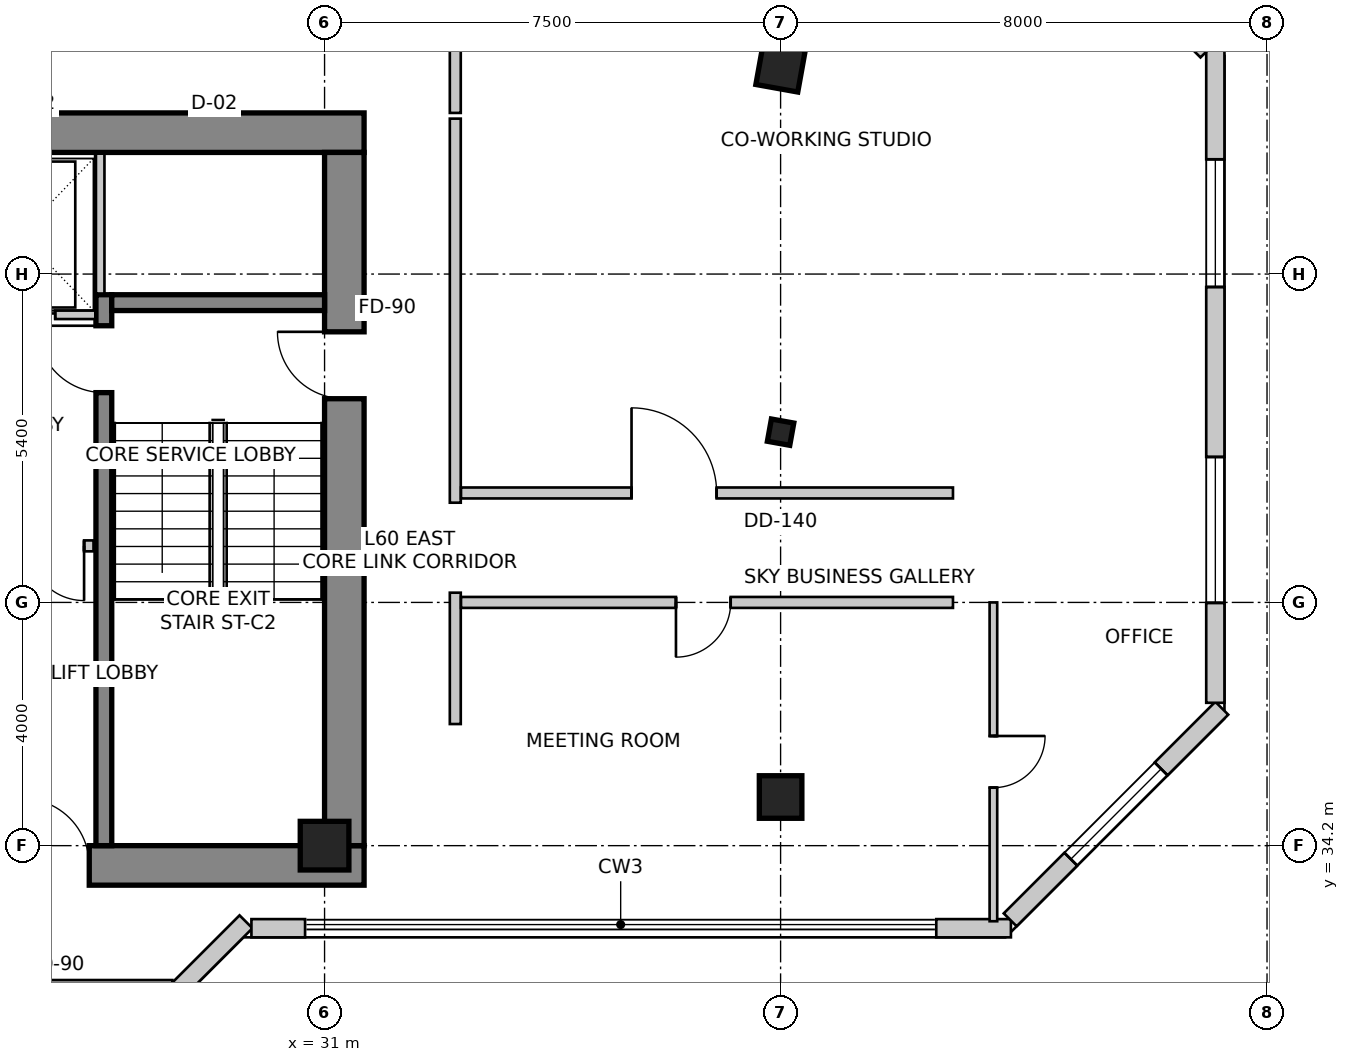
"""IFC4 building model, lengths in metres.
Left out: names, types, materials, properties, quantities, classifications, styles, units other than length and angle.
Written with IfcOpenShell. Run it as: python <this file> out.ifc"""

import sys

from ifc_helpers import new_model, si_unit, direction, frame, frame_2d, origin, origin_2d, place, context, subcontext, project, spatial, rectangle, i_section, extrude, source, transform, mapped, element, fill, save


model = new_model("IFC4")
c1 = context("Model", 3, precision=1e-05, world=origin(), true_north=direction((0.0, 1.0)))
c2 = subcontext(c1, "Body", "Model", "MODEL_VIEW")
j1 = project(units=[si_unit("LENGTHUNIT", "METRE"), si_unit("PLANEANGLEUNIT", "RADIAN")], contexts=[c1])
p1 = place(None, origin())
s1 = spatial("IfcSite", under=j1, at=p1, CompositionType="ELEMENT")
p2 = place(p1, origin())
s2 = spatial("IfcBuilding", under=s1, at=p2, CompositionType="ELEMENT")
p3 = place(p2, frame((0.0, 0.0, 235.9)))
s3 = spatial("IfcBuildingStorey", under=s2, at=p3, CompositionType="ELEMENT", Elevation=235.9)
p4 = place(p3, frame((15.95, 45.925, 0.0), z_axis=(0.0, 0.0, 1.0), x_axis=(1.0, 0.0, 0.0)))
e1 = element("IfcWall", 1, at=p4, inside=s3, PredefinedType="SHEAR", context=c2, shape_type="SweptSolid", body=[
    extrude(rectangle(XDim=15.7, YDim=0.65, at=frame_2d((7.85, 0.0))), origin(), (0.0, 0.0, 1.0), 3.5),
])
p5 = place(p3, frame((15.95, 33.875, 0.0), z_axis=(0.0, 0.0, 1.0), x_axis=(1.0, 0.0, 0.0)))
e2 = element("IfcWall", 2, at=p5, inside=s3, PredefinedType="SHEAR", context=c2, shape_type="SweptSolid", body=[
    extrude(rectangle(XDim=15.7, YDim=0.65, at=frame_2d((7.85, 0.0))), origin(), (0.0, 0.0, 1.0), 3.5),
])
m1 = source(origin(), c2, "Body", "SweptSolid", [
    extrude(rectangle(XDim=1.1, YDim=2.15, at=frame_2d((0.55, 1.075))), frame((0.0, 0.335, 0.0), z_axis=(0.0, -1.0, 0.0), x_axis=(1.0, 0.0, 0.0)), (0.0, 0.0, 1.0), 0.67),
])
p6 = place(p5, frame((10.08, 0.0, 0.0)))
e3 = element("IfcOpeningElement", 3, at=p6, cuts=e2, PredefinedType="OPENING", context=c2, shape_type="MappedRepresentation", body=[
    mapped(m1, transform((0.0, 0.0, 0.0), scale=1.0)),
])
p7 = place(p3, frame((31.325, 34.2, 0.0), z_axis=(0.0, 0.0, 1.0), x_axis=(0.0, 1.0, 0.0)))
e4 = element("IfcWall", 4, at=p7, inside=s3, PredefinedType="SHEAR", context=c2, shape_type="SweptSolid", body=[
    extrude(rectangle(XDim=11.4, YDim=0.65, at=frame_2d((5.7, 0.0))), origin(), (0.0, 0.0, 1.0), 3.5),
])
p8 = place(p7, frame((7.35, 0.0, 0.0)))
e5 = element("IfcOpeningElement", 5, at=p8, cuts=e4, PredefinedType="OPENING", context=c2, shape_type="MappedRepresentation", body=[
    mapped(m1, transform((0.0, 0.0, 0.0), scale=1.0)),
])
p9 = place(p3, frame((27.37, 34.2, 0.0), z_axis=(0.0, 0.0, 1.0), x_axis=(0.0, 1.0, 0.0)))
e6 = element("IfcWall", 6, at=p9, inside=s3, PredefinedType="SHEAR", context=c2, shape_type="SweptSolid", body=[
    extrude(rectangle(XDim=9.06, YDim=0.26, at=frame_2d((4.53, 0.0))), origin(), (0.0, 0.0, 1.0), 3.5),
])
m2 = source(origin(), c2, "Body", "SweptSolid", [
    extrude(rectangle(XDim=1.1, YDim=2.15, at=frame_2d((0.55, 1.075))), frame((0.0, 0.14, 0.0), z_axis=(0.0, -1.0, 0.0), x_axis=(1.0, 0.0, 0.0)), (0.0, 0.0, 1.0), 0.28),
])
p10 = place(p9, frame((7.45, 0.0, 0.0)))
e7 = element("IfcOpeningElement", 7, at=p10, cuts=e6, PredefinedType="OPENING", context=c2, shape_type="MappedRepresentation", body=[
    mapped(m2, transform((0.0, 0.0, 0.0), scale=1.0)),
])
p11 = place(p3, frame((27.5, 43.13, 0.0), z_axis=(0.0, 0.0, 1.0), x_axis=(1.0, 0.0, 0.0)))
e8 = element("IfcWall", 8, at=p11, inside=s3, PredefinedType="SHEAR", context=c2, shape_type="SweptSolid", body=[
    extrude(rectangle(XDim=3.5, YDim=0.26, at=frame_2d((1.75, 0.0))), origin(), (0.0, 0.0, 1.0), 3.5),
])
m3 = source(origin(), c2, "Body", "SweptSolid", [
    extrude(rectangle(XDim=0.7, YDim=0.7, at=origin_2d()), origin(), (0.0, 0.0, 1.0), 3.5),
])
p12 = place(p3, frame((38.5, 47.0, 0.0), z_axis=(0.0, 0.0, 1.0), x_axis=(0.984195607969, -0.17708474032, 0.0)))
e9 = element("IfcColumn", 9, at=p12, inside=s3, PredefinedType="COLUMN", context=c2, shape_type="MappedRepresentation", body=[
    mapped(m3, transform((0.0, 0.0, 0.0), scale=1.0)),
])
m4 = source(origin(), c2, "Body", "SweptSolid", [
    extrude(rectangle(XDim=0.8, YDim=0.8, at=origin_2d()), origin(), (0.0, 0.0, 1.0), 3.5),
])
p13 = place(p3, frame((31.0, 34.2, 0.0), z_axis=(0.0, 0.0, 1.0), x_axis=(1.0, 0.0, 0.0)))
e10 = element("IfcColumn", 10, at=p13, inside=s3, PredefinedType="COLUMN", context=c2, shape_type="MappedRepresentation", body=[
    mapped(m4, transform((0.0, 0.0, 0.0), scale=1.0)),
])
p14 = place(p3, frame((38.5, 35.0, 0.0), z_axis=(0.0, 0.0, 1.0), x_axis=(1.0, 0.0, 0.0)))
e11 = element("IfcColumn", 11, at=p14, inside=s3, PredefinedType="COLUMN", context=c2, shape_type="MappedRepresentation", body=[
    mapped(m3, transform((0.0, 0.0, 0.0), scale=1.0)),
])
m5 = source(origin(), c2, "Body", "SweptSolid", [
    extrude(i_section(OverallWidth=0.374, OverallDepth=0.372, WebThickness=0.016, FlangeThickness=0.026, FilletRadius=0.015, at=origin_2d()), origin(), (0.0, 0.0, 1.0), 3.5),
])
p15 = place(p3, frame((38.5, 41.0, 0.0), z_axis=(0.0, 0.0, 1.0), x_axis=(0.984195607969, -0.17708474032, 0.0)))
e12 = element("IfcColumn", 12, at=p15, inside=s3, PredefinedType="COLUMN", context=c2, shape_type="MappedRepresentation", body=[
    mapped(m5, transform((0.0, 0.0, 0.0), scale=1.0)),
])
p16 = place(p3, frame((27.652, 30.892, 0.0), z_axis=(0.0, 0.0, 1.0), x_axis=(0.707106781187, 0.707106781187, 0.0)))
e13 = element("IfcWall", 13, at=p16, inside=s3, PredefinedType="SOLIDWALL", context=c2, shape_type="SweptSolid", body=[
    extrude(rectangle(XDim=2.907, YDim=0.3, at=frame_2d((1.454, 0.0))), origin(), (0.0, 0.0, 1.0), 3.25),
])
p17 = place(p3, frame((29.797, 32.842, 0.0), z_axis=(0.0, 0.0, 1.0), x_axis=(1.0, 0.0, 0.0)))
e14 = element("IfcWall", 14, at=p17, inside=s3, PredefinedType="SOLIDWALL", context=c2, shape_type="SweptSolid", body=[
    extrude(rectangle(XDim=0.882, YDim=0.3, at=frame_2d((0.441, 0.0))), origin(), (0.0, 0.0, 1.0), 3.25),
])
p18 = place(p3, frame((41.06, 32.842, 0.0), z_axis=(0.0, 0.0, 1.0), x_axis=(1.0, 0.0, 0.0)))
e15 = element("IfcWall", 15, at=p18, inside=s3, PredefinedType="SOLIDWALL", context=c2, shape_type="SweptSolid", body=[
    extrude(rectangle(XDim=1.228, YDim=0.3, at=frame_2d((0.614, 0.0))), origin(), (0.0, 0.0, 1.0), 3.25),
])
p19 = place(p3, frame((42.276, 32.98, 0.0), z_axis=(0.0, 0.0, 1.0), x_axis=(0.707106781187, 0.707106781187, 0.0)))
e16 = element("IfcWall", 16, at=p19, inside=s3, PredefinedType="SOLIDWALL", context=c2, shape_type="SweptSolid", body=[
    extrude(rectangle(XDim=4.922, YDim=0.3, at=frame_2d((2.461, 0.0))), origin(), (0.0, 0.0, 1.0), 3.25),
])
m6 = source(origin(), c2, "Body", "SweptSolid", [
    extrude(rectangle(XDim=2.1, YDim=2.0, at=frame_2d((1.05, 1.0))), frame((0.0, 0.16, 0.0), z_axis=(0.0, -1.0, 0.0), x_axis=(1.0, 0.0, 0.0)), (0.0, 0.0, 1.0), 0.32),
])
p20 = place(p19, frame((1.411, 0.0, 0.85)))
e17 = element("IfcOpeningElement", 17, at=p20, cuts=e16, PredefinedType="OPENING", context=c2, shape_type="MappedRepresentation", body=[
    mapped(m6, transform((0.0, 0.0, 0.0), scale=1.0)),
])
p21 = place(p3, frame((45.65, 36.549, 0.0), z_axis=(0.0, 0.0, 1.0), x_axis=(0.0, 1.0, 0.0)))
e18 = element("IfcWall", 18, at=p21, inside=s3, PredefinedType="SOLIDWALL", context=c2, shape_type="SweptSolid", body=[
    extrude(rectangle(XDim=10.73, YDim=0.3, at=frame_2d((5.365, 0.0))), origin(), (0.0, 0.0, 1.0), 3.25),
])
m7 = source(origin(), c2, "Body", "SweptSolid", [
    extrude(rectangle(XDim=2.4, YDim=2.2, at=frame_2d((1.2, 1.1))), frame((0.0, 0.16, 0.0), z_axis=(0.0, -1.0, 0.0), x_axis=(1.0, 0.0, 0.0)), (0.0, 0.0, 1.0), 0.32),
])
p22 = place(p21, frame((1.643, 0.0, 0.85)))
e19 = element("IfcOpeningElement", 19, at=p22, cuts=e18, PredefinedType="OPENING", context=c2, shape_type="MappedRepresentation", body=[
    mapped(m7, transform((0.0, 0.0, 0.0), scale=1.0)),
])
p23 = place(p21, frame((6.838, 0.0, 0.85)))
e20 = element("IfcOpeningElement", 20, at=p23, cuts=e18, PredefinedType="OPENING", context=c2, shape_type="MappedRepresentation", body=[
    mapped(m6, transform((0.0, 0.0, 0.0), scale=1.0)),
])
p24 = place(p3, frame((45.512, 47.268, 0.0), z_axis=(0.0, 0.0, 1.0), x_axis=(-0.707106781187, 0.707106781187, 0.0)))
e21 = element("IfcWall", 21, at=p24, inside=s3, PredefinedType="SOLIDWALL", context=c2, shape_type="SweptSolid", body=[
    extrude(rectangle(XDim=2.674, YDim=0.3, at=frame_2d((1.337, 0.0))), origin(), (0.0, 0.0, 1.0), 3.25),
])
m8 = source(origin(), c2, "Body", "SweptSolid", [
    extrude(rectangle(XDim=1.5, YDim=1.8, at=frame_2d((0.75, 0.9))), frame((0.0, 0.16, 0.0), z_axis=(0.0, -1.0, 0.0), x_axis=(1.0, 0.0, 0.0)), (0.0, 0.0, 1.0), 0.32),
])
p25 = place(p24, frame((0.587, 0.0, 0.85)))
e22 = element("IfcOpeningElement", 22, at=p25, cuts=e21, PredefinedType="OPENING", context=c2, shape_type="MappedRepresentation", body=[
    mapped(m8, transform((0.0, 0.0, 0.0), scale=1.0)),
])
p26 = place(p3, frame((20.37, 42.93, 0.0), z_axis=(0.0, 0.0, 1.0), x_axis=(1.0, 0.0, 0.0)))
e23 = element("IfcWall", 23, at=p26, inside=s3, PredefinedType="SOLIDWALL", context=c2, shape_type="SweptSolid", body=[
    extrude(rectangle(XDim=6.86, YDim=0.14, at=frame_2d((3.43, 0.0))), origin(), (0.0, 0.0, 1.0), 3.25),
])
m9 = source(origin(), c2, "Body", "SweptSolid", [
    extrude(rectangle(XDim=1.1, YDim=2.15, at=frame_2d((0.55, 1.075))), frame((0.0, 0.08, 0.0), z_axis=(0.0, -1.0, 0.0), x_axis=(1.0, 0.0, 0.0)), (0.0, 0.0, 1.0), 0.16),
])
p27 = place(p26, frame((0.5, 0.0, 0.0)))
e24 = element("IfcOpeningElement", 24, at=p27, cuts=e23, PredefinedType="OPENING", context=c2, shape_type="MappedRepresentation", body=[
    mapped(m9, transform((0.0, 0.0, 0.0), scale=1.0)),
])
p28 = place(p26, frame((2.7, 0.0, 0.0)))
e25 = element("IfcOpeningElement", 25, at=p28, cuts=e23, PredefinedType="OPENING", context=c2, shape_type="MappedRepresentation", body=[
    mapped(m9, transform((0.0, 0.0, 0.0), scale=1.0)),
])
p29 = place(p26, frame((5.1, 0.0, 0.0)))
e26 = element("IfcOpeningElement", 26, at=p29, cuts=e23, PredefinedType="OPENING", context=c2, shape_type="MappedRepresentation", body=[
    mapped(m9, transform((0.0, 0.0, 0.0), scale=1.0)),
])
p30 = place(p3, frame((27.31, 43.28, 0.0), z_axis=(0.0, 0.0, 1.0), x_axis=(0.0, 1.0, 0.0)))
e27 = element("IfcWall", 27, at=p30, inside=s3, PredefinedType="SOLIDWALL", context=c2, shape_type="SweptSolid", body=[
    extrude(rectangle(XDim=2.3, YDim=0.14, at=frame_2d((1.15, 0.0))), origin(), (0.0, 0.0, 1.0), 3.25),
])
p31 = place(p3, frame((27.2, 39.13, 0.0), z_axis=(0.0, 0.0, 1.0), x_axis=(-1.0, 0.0, 0.0)))
e28 = element("IfcWall", 28, at=p31, inside=s3, PredefinedType="PARTITIONING", context=c2, shape_type="SweptSolid", body=[
    extrude(rectangle(XDim=1.21, YDim=0.18, at=frame_2d((0.605, 0.0))), origin(), (0.0, 0.0, 1.0), 3.25),
])
m10 = source(origin(), c2, "Body", "SweptSolid", [
    extrude(rectangle(XDim=0.9, YDim=2.15, at=frame_2d((0.45, 1.075))), frame((0.0, 0.1, 0.0), z_axis=(0.0, -1.0, 0.0), x_axis=(1.0, 0.0, 0.0)), (0.0, 0.0, 1.0), 0.2),
])
p32 = place(p31, frame((0.155, 0.0, 0.0)))
e29 = element("IfcOpeningElement", 29, at=p32, cuts=e28, PredefinedType="OPENING", context=c2, shape_type="MappedRepresentation", body=[
    mapped(m10, transform((0.0, 0.0, 0.0), scale=1.0)),
])
p33 = place(p3, frame((28.497, 31.9, 0.0), z_axis=(0.0, 0.0, 1.0), x_axis=(-1.0, 0.0, 0.0)))
e30 = element("IfcWall", 30, at=p33, inside=s3, PredefinedType="PARTITIONING", context=c2, shape_type="SweptSolid", body=[
    extrude(rectangle(XDim=9.057, YDim=0.18, at=frame_2d((4.529, 0.0))), origin(), (0.0, 0.0, 1.0), 2.835),
])
p34 = place(p3, frame((33.15, 47.706, 0.0), z_axis=(0.0, 0.0, 1.0), x_axis=(0.0, -1.0, 0.0)))
e31 = element("IfcWall", 31, at=p34, inside=s3, PredefinedType="PARTITIONING", context=c2, shape_type="SweptSolid", body=[
    extrude(rectangle(XDim=1.456, YDim=0.18, at=frame_2d((0.728, 0.0))), origin(), (0.0, 0.0, 1.0), 2.835),
])
p35 = place(p3, frame((33.15, 46.156, 0.0), z_axis=(0.0, 0.0, 1.0), x_axis=(0.0, -1.0, 0.0)))
e32 = element("IfcWall", 32, at=p35, inside=s3, PredefinedType="PARTITIONING", context=c2, shape_type="SweptSolid", body=[
    extrude(rectangle(XDim=6.316, YDim=0.18, at=frame_2d((3.158, 0.0))), origin(), (0.0, 0.0, 1.0), 2.688),
])
p36 = place(p3, frame((33.15, 38.36, 0.0), z_axis=(0.0, 0.0, 1.0), x_axis=(0.0, -1.0, 0.0)))
e33 = element("IfcWall", 33, at=p36, inside=s3, PredefinedType="PARTITIONING", context=c2, shape_type="SweptSolid", body=[
    extrude(rectangle(XDim=2.16, YDim=0.18, at=frame_2d((1.08, 0.0))), origin(), (0.0, 0.0, 1.0), 3.25),
])
p37 = place(p3, frame((33.244, 40.0, 0.0), z_axis=(0.0, 0.0, 1.0), x_axis=(1.0, 0.0, 0.0)))
e34 = element("IfcWall", 34, at=p37, inside=s3, PredefinedType="PARTITIONING", context=c2, shape_type="SweptSolid", body=[
    extrude(rectangle(XDim=8.091, YDim=0.18, at=frame_2d((4.045, 0.0))), origin(), (0.0, 0.0, 1.0), 2.766),
])
m11 = source(origin(), c2, "Body", "SweptSolid", [
    extrude(rectangle(XDim=1.4, YDim=2.15, at=frame_2d((0.7, 1.075))), frame((0.0, 0.1, 0.0), z_axis=(0.0, -1.0, 0.0), x_axis=(1.0, 0.0, 0.0)), (0.0, 0.0, 1.0), 0.2),
])
p38 = place(p37, frame((2.804, 0.0, 0.0)))
e35 = element("IfcOpeningElement", 35, at=p38, cuts=e34, PredefinedType="OPENING", context=c2, shape_type="MappedRepresentation", body=[
    mapped(m11, transform((0.0, 0.0, 0.0), scale=1.0)),
])
p39 = place(p3, frame((41.335, 38.2, 0.0), z_axis=(0.0, 0.0, 1.0), x_axis=(-1.0, 0.0, 0.0)))
e36 = element("IfcWall", 36, at=p39, inside=s3, PredefinedType="PARTITIONING", context=c2, shape_type="SweptSolid", body=[
    extrude(rectangle(XDim=8.091, YDim=0.18, at=frame_2d((4.045, 0.0))), origin(), (0.0, 0.0, 1.0), 2.766),
])
p40 = place(p39, frame((3.656, 0.0, 0.0)))
e37 = element("IfcOpeningElement", 37, at=p40, cuts=e36, PredefinedType="OPENING", context=c2, shape_type="MappedRepresentation", body=[
    mapped(m10, transform((0.0, 0.0, 0.0), scale=1.0)),
])
p41 = place(p3, frame((42.0, 38.2, 0.0), z_axis=(0.0, 0.0, 1.0), x_axis=(0.0, -1.0, 0.0)))
e38 = element("IfcWall", 38, at=p41, inside=s3, PredefinedType="PARTITIONING", context=c2, shape_type="SweptSolid", body=[
    extrude(rectangle(XDim=5.243, YDim=0.125, at=frame_2d((2.622, 0.0))), origin(), (0.0, 0.0, 1.0), 3.25),
])
m12 = source(origin(), c2, "Body", "SweptSolid", [
    extrude(rectangle(XDim=0.85, YDim=2.15, at=frame_2d((0.425, 1.075))), frame((0.0, 0.073, 0.0), z_axis=(0.0, -1.0, 0.0), x_axis=(1.0, 0.0, 0.0)), (0.0, 0.0, 1.0), 0.145),
])
p42 = place(p41, frame((2.197, 0.0, 0.0)))
e39 = element("IfcOpeningElement", 39, at=p42, cuts=e38, PredefinedType="OPENING", context=c2, shape_type="MappedRepresentation", body=[
    mapped(m12, transform((0.0, 0.0, 0.0), scale=1.0)),
])
m13 = source(origin(), c2, "Body", "SweptSolid", [
    extrude(rectangle(XDim=2.1, YDim=2.0, at=frame_2d((1.05, 1.0))), frame((0.0, -0.015, 0.0), z_axis=(0.0, -1.0, 0.0), x_axis=(1.0, 0.0, 0.0)), (0.0, 0.0, 1.0), 0.06),
])
p43 = place(p20, origin())
e40 = element("IfcWindow", 40, at=p43, inside=s3, PartitioningType="SINGLE_PANEL", PredefinedType="WINDOW", context=c2, shape_type="MappedRepresentation", body=[
    mapped(m13, transform((0.0, 0.0, 0.0), scale=1.0)),
])
fill(e17, e40)
m14 = source(origin(), c2, "Body", "SweptSolid", [
    extrude(rectangle(XDim=2.4, YDim=2.2, at=frame_2d((1.2, 1.1))), frame((0.0, -0.015, 0.0), z_axis=(0.0, -1.0, 0.0), x_axis=(1.0, 0.0, 0.0)), (0.0, 0.0, 1.0), 0.06),
])
p44 = place(p22, origin())
e41 = element("IfcWindow", 41, at=p44, inside=s3, PartitioningType="SINGLE_PANEL", PredefinedType="WINDOW", context=c2, shape_type="MappedRepresentation", body=[
    mapped(m14, transform((0.0, 0.0, 0.0), scale=1.0)),
])
fill(e19, e41)
p45 = place(p23, origin())
e42 = element("IfcWindow", 42, at=p45, inside=s3, PartitioningType="SINGLE_PANEL", PredefinedType="WINDOW", context=c2, shape_type="MappedRepresentation", body=[
    mapped(m13, transform((0.0, 0.0, 0.0), scale=1.0)),
])
fill(e20, e42)
m15 = source(origin(), c2, "Body", "SweptSolid", [
    extrude(rectangle(XDim=1.1, YDim=2.15, at=frame_2d((0.55, 1.075))), frame((0.0, 0.025, 0.0), z_axis=(0.0, -1.0, 0.0), x_axis=(1.0, 0.0, 0.0)), (0.0, 0.0, 1.0), 0.05),
])
p46 = place(p29, origin())
e43 = element("IfcDoor", 43, at=p46, inside=s3, OperationType="SLIDING_TO_LEFT", PredefinedType="DOOR", context=c2, shape_type="MappedRepresentation", body=[
    mapped(m15, transform((0.0, 0.0, 0.0), scale=1.0)),
])
fill(e26, e43)
m16 = source(origin(), c2, "Body", "SweptSolid", [
    extrude(rectangle(XDim=1.1, YDim=2.15, at=frame_2d((0.55, 1.075))), frame((0.0, 0.025, 0.0), z_axis=(0.0, -1.0, 0.0), x_axis=(1.0, 0.0, 0.0)), (0.0, 0.0, 1.0), 0.05),
])
p47 = place(p10, origin())
e44 = element("IfcDoor", 44, at=p47, inside=s3, OperationType="SINGLE_SWING_RIGHT", PredefinedType="DOOR", context=c2, shape_type="MappedRepresentation", body=[
    mapped(m16, transform((0.0, 0.0, 0.0), scale=1.0)),
])
fill(e7, e44)
p48 = place(p8, origin())
e45 = element("IfcDoor", 45, at=p48, inside=s3, OperationType="SINGLE_SWING_RIGHT", PredefinedType="DOOR", context=c2, shape_type="MappedRepresentation", body=[
    mapped(m16, transform((0.0, 0.0, 0.0), scale=1.0)),
])
fill(e5, e45)
p49 = place(p6, origin())
e46 = element("IfcDoor", 46, at=p49, inside=s3, OperationType="SINGLE_SWING_LEFT", PredefinedType="DOOR", context=c2, shape_type="MappedRepresentation", body=[
    mapped(m16, transform((0.0, 0.0, 0.0), scale=1.0)),
])
fill(e3, e46)
m17 = source(origin(), c2, "Body", "SweptSolid", [
    extrude(rectangle(XDim=0.9, YDim=2.15, at=frame_2d((0.45, 1.075))), frame((0.0, 0.025, 0.0), z_axis=(0.0, -1.0, 0.0), x_axis=(1.0, 0.0, 0.0)), (0.0, 0.0, 1.0), 0.05),
])
p50 = place(p32, origin())
e47 = element("IfcDoor", 47, at=p50, inside=s3, OperationType="SINGLE_SWING_LEFT", PredefinedType="DOOR", context=c2, shape_type="MappedRepresentation", body=[
    mapped(m17, transform((0.0, 0.0, 0.0), scale=1.0)),
])
fill(e29, e47)
m18 = source(origin(), c2, "Body", "SweptSolid", [
    extrude(rectangle(XDim=1.4, YDim=2.15, at=frame_2d((0.7, 1.075))), frame((0.0, 0.025, 0.0), z_axis=(0.0, -1.0, 0.0), x_axis=(1.0, 0.0, 0.0)), (0.0, 0.0, 1.0), 0.05),
])
p51 = place(p38, origin())
e48 = element("IfcDoor", 48, at=p51, inside=s3, OperationType="SINGLE_SWING_LEFT", PredefinedType="DOOR", context=c2, shape_type="MappedRepresentation", body=[
    mapped(m18, transform((0.0, 0.0, 0.0), scale=1.0)),
])
fill(e35, e48)
m19 = source(origin(), c2, "Body", "SweptSolid", [
    extrude(rectangle(XDim=0.9, YDim=2.15, at=frame_2d((0.45, 1.075))), frame((0.0, 0.025, 0.0), z_axis=(0.0, -1.0, 0.0), x_axis=(1.0, 0.0, 0.0)), (0.0, 0.0, 1.0), 0.05),
])
p52 = place(p40, origin())
e49 = element("IfcDoor", 49, at=p52, inside=s3, OperationType="SINGLE_SWING_RIGHT", PredefinedType="DOOR", context=c2, shape_type="MappedRepresentation", body=[
    mapped(m19, transform((0.0, 0.0, 0.0), scale=1.0)),
])
fill(e37, e49)
m20 = source(origin(), c2, "Body", "SweptSolid", [
    extrude(rectangle(XDim=0.85, YDim=2.15, at=frame_2d((0.425, 1.075))), frame((0.0, 0.025, 0.0), z_axis=(0.0, -1.0, 0.0), x_axis=(1.0, 0.0, 0.0)), (0.0, 0.0, 1.0), 0.05),
])
p53 = place(p42, origin())
e50 = element("IfcDoor", 50, at=p53, inside=s3, OperationType="SINGLE_SWING_LEFT", PredefinedType="DOOR", context=c2, shape_type="MappedRepresentation", body=[
    mapped(m20, transform((0.0, 0.0, 0.0), scale=1.0)),
])
fill(e39, e50)
save(model, sys.argv[1])
